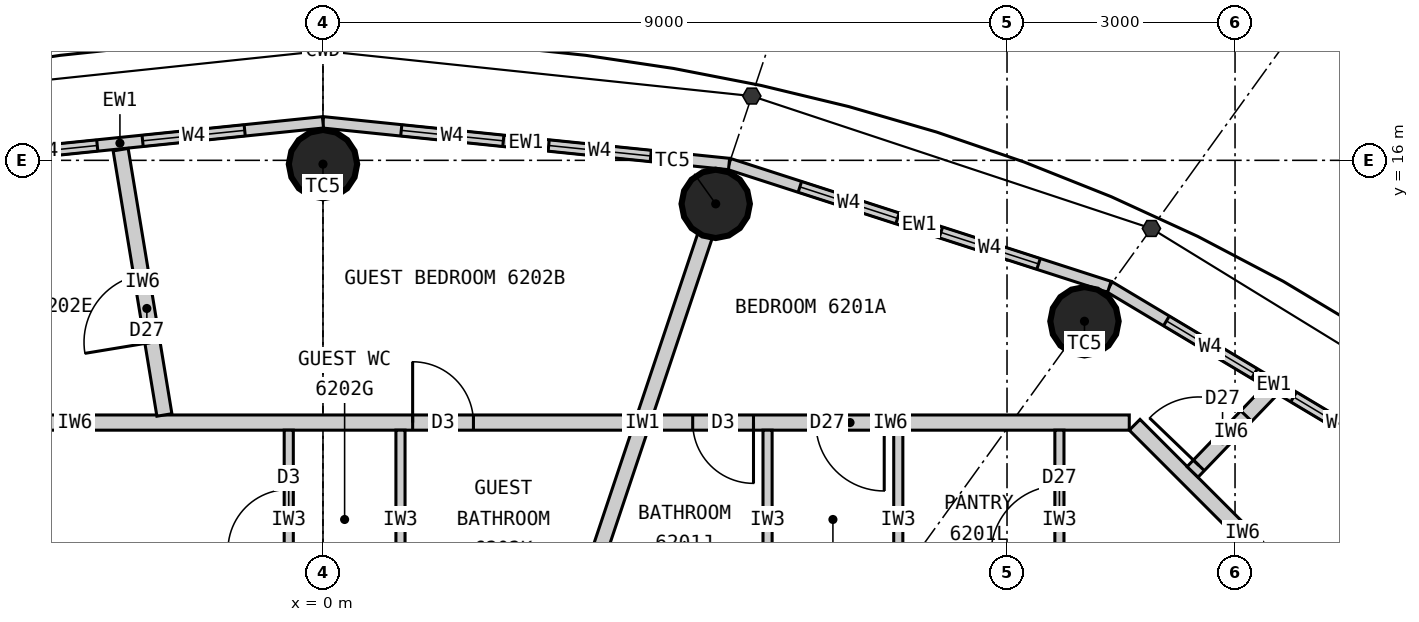
"""IFC4 building model, lengths in metres.
Left out: names, types, materials, properties, quantities, classifications, styles, units other than length and angle.
Written with IfcOpenShell. Run it as: python <this file> out.ifc"""

import sys

from ifc_helpers import new_model, si_unit, direction, frame, frame_2d, origin, origin_2d, place, context, subcontext, project, spatial, rectangle, circle, extrude, clip, halfspace, element, fill, save


model = new_model("IFC4")
c1 = context("Model", 3, precision=1e-05, world=origin(), true_north=direction((0.0, 1.0)))
c2 = subcontext(c1, "Body", "Model", "MODEL_VIEW")
j1 = project(units=[si_unit("LENGTHUNIT", "METRE"), si_unit("PLANEANGLEUNIT", "RADIAN")], contexts=[c1])
p1 = place(None, origin())
s1 = spatial("IfcSite", under=j1, at=p1, CompositionType="ELEMENT")
p2 = place(p1, origin())
s2 = spatial("IfcBuilding", under=s1, at=p2, CompositionType="ELEMENT")
p3 = place(p2, frame((0.0, 0.0, 229.2)))
s3 = spatial("IfcBuildingStorey", under=s2, at=p3, CompositionType="ELEMENT", Elevation=229.2)
for number, where, z_axis, x_axis in (
    (1, (10.019, 13.883, 0.0), (0.0, 0.0, 1.0), (1.0, 0.0, 0.0)),
    (2, (5.167, 15.427, 0.0), (0.0, 0.0, 1.0), (1.0, 0.0, 0.0)),
    (3, (0.0, 15.95, 0.0), (0.0, 0.0, 1.0), (1.0, 0.0, 0.0)),
):
    element("IfcColumn", number, at=place(p3, frame(where, z_axis=z_axis, x_axis=x_axis)), inside=s3, PredefinedType="COLUMN", context=c2, shape_type="Clipping", body=[
        clip(extrude(circle(Radius=0.45, at=origin_2d()), origin(), (0.0, 0.0, 1.0), 3.3), halfspace(frame((0.0, 0.0, 2.25), z_axis=(0.0, 0.0, 1.0), x_axis=(1.0, 0.0, 0.0)), False)),
    ])
p4 = place(p3, frame((14.68, 11.744, 0.0), z_axis=(0.0, 0.0, 1.0), x_axis=(-0.85822150553, 0.513279502265, 0.0)))
e4 = element("IfcWall", 4, at=p4, inside=s3, PredefinedType="ELEMENTEDWALL", context=c2, shape_type="SweptSolid", body=[
    extrude(rectangle(XDim=5.05, YDim=0.15, at=frame_2d((2.525, 0.0))), origin(), (0.0, 0.0, 1.0), 3.05),
])
p5 = place(p4, frame((0.875, 0.0, 0.9)))
e5 = element("IfcOpeningElement", 5, at=p5, cuts=e4, PredefinedType="OPENING", context=c2, shape_type="SweptSolid", body=[
    extrude(rectangle(XDim=1.35, YDim=1.9, at=frame_2d((0.675, 0.95))), frame((0.0, 0.085, 0.0), z_axis=(0.0, -1.0, 0.0), x_axis=(1.0, 0.0, 0.0)), (0.0, 0.0, 1.0), 0.17),
])
p6 = place(p4, frame((2.825, 0.0, 0.9)))
e6 = element("IfcOpeningElement", 6, at=p6, cuts=e4, PredefinedType="OPENING", context=c2, shape_type="SweptSolid", body=[
    extrude(rectangle(XDim=1.35, YDim=1.9, at=frame_2d((0.675, 0.95))), frame((0.0, 0.085, 0.0), z_axis=(0.0, -1.0, 0.0), x_axis=(1.0, 0.0, 0.0)), (0.0, 0.0, 1.0), 0.17),
])
p7 = place(p3, frame((10.346, 14.336, 0.0), z_axis=(0.0, 0.0, 1.0), x_axis=(-0.951644702515, 0.307200846638, 0.0)))
e7 = element("IfcWall", 7, at=p7, inside=s3, PredefinedType="ELEMENTEDWALL", context=c2, shape_type="SweptSolid", body=[
    extrude(rectangle(XDim=5.258, YDim=0.15, at=frame_2d((2.629, 0.0))), origin(), (0.0, 0.0, 1.0), 3.05),
])
p8 = place(p7, frame((0.979, 0.0, 0.9)))
e8 = element("IfcOpeningElement", 8, at=p8, cuts=e7, PredefinedType="OPENING", context=c2, shape_type="SweptSolid", body=[
    extrude(rectangle(XDim=1.35, YDim=1.9, at=frame_2d((0.675, 0.95))), frame((0.0, 0.085, 0.0), z_axis=(0.0, -1.0, 0.0), x_axis=(1.0, 0.0, 0.0)), (0.0, 0.0, 1.0), 0.17),
])
p9 = place(p7, frame((2.929, 0.0, 0.9)))
e9 = element("IfcOpeningElement", 9, at=p9, cuts=e7, PredefinedType="OPENING", context=c2, shape_type="SweptSolid", body=[
    extrude(rectangle(XDim=1.35, YDim=1.9, at=frame_2d((0.675, 0.95))), frame((0.0, 0.085, 0.0), z_axis=(0.0, -1.0, 0.0), x_axis=(1.0, 0.0, 0.0)), (0.0, 0.0, 1.0), 0.17),
])
p10 = place(p3, frame((5.343, 15.952, 0.0), z_axis=(0.0, 0.0, 1.0), x_axis=(-0.994774574972, 0.102095763818, 0.0)))
e10 = element("IfcWall", 10, at=p10, inside=s3, PredefinedType="ELEMENTEDWALL", context=c2, shape_type="SweptSolid", body=[
    extrude(rectangle(XDim=5.371, YDim=0.15, at=frame_2d((2.686, 0.0))), origin(), (0.0, 0.0, 1.0), 3.05),
])
p11 = place(p10, frame((1.035, 0.0, 0.9)))
e11 = element("IfcOpeningElement", 11, at=p11, cuts=e10, PredefinedType="OPENING", context=c2, shape_type="SweptSolid", body=[
    extrude(rectangle(XDim=1.35, YDim=1.9, at=frame_2d((0.675, 0.95))), frame((0.0, 0.085, 0.0), z_axis=(0.0, -1.0, 0.0), x_axis=(1.0, 0.0, 0.0)), (0.0, 0.0, 1.0), 0.17),
])
p12 = place(p10, frame((2.985, 0.0, 0.9)))
e12 = element("IfcOpeningElement", 12, at=p12, cuts=e10, PredefinedType="OPENING", context=c2, shape_type="SweptSolid", body=[
    extrude(rectangle(XDim=1.35, YDim=1.9, at=frame_2d((0.675, 0.95))), frame((0.0, 0.085, 0.0), z_axis=(0.0, -1.0, 0.0), x_axis=(1.0, 0.0, 0.0)), (0.0, 0.0, 1.0), 0.17),
])
p13 = place(p3, frame((0.0, 16.5, 0.0), z_axis=(0.0, 0.0, 1.0), x_axis=(-0.994774574972, -0.102095763818, 0.0)))
e13 = element("IfcWall", 13, at=p13, inside=s3, PredefinedType="ELEMENTEDWALL", context=c2, shape_type="SweptSolid", body=[
    extrude(rectangle(XDim=5.371, YDim=0.15, at=frame_2d((2.686, 0.0))), origin(), (0.0, 0.0, 1.0), 3.05),
])
p14 = place(p13, frame((1.035, 0.0, 0.9)))
e14 = element("IfcOpeningElement", 14, at=p14, cuts=e13, PredefinedType="OPENING", context=c2, shape_type="SweptSolid", body=[
    extrude(rectangle(XDim=1.35, YDim=1.9, at=frame_2d((0.675, 0.95))), frame((0.0, 0.085, 0.0), z_axis=(0.0, -1.0, 0.0), x_axis=(1.0, 0.0, 0.0)), (0.0, 0.0, 1.0), 0.17),
])
p15 = place(p13, frame((2.985, 0.0, 0.9)))
e15 = element("IfcOpeningElement", 15, at=p15, cuts=e13, PredefinedType="OPENING", context=c2, shape_type="SweptSolid", body=[
    extrude(rectangle(XDim=1.35, YDim=1.9, at=frame_2d((0.675, 0.95))), frame((0.0, 0.085, 0.0), z_axis=(0.0, -1.0, 0.0), x_axis=(1.0, 0.0, 0.0)), (0.0, 0.0, 1.0), 0.17),
])
p16 = place(p3, frame((3.383, 10.1, 0.0), z_axis=(0.0, 0.0, 1.0), x_axis=(0.317602151035, 0.948224063003, 0.0)))
e16 = element("IfcWall", 16, at=p16, inside=s3, PredefinedType="PARTITIONING", context=c2, shape_type="SweptSolid", body=[
    extrude(rectangle(XDim=5.168, YDim=0.2, at=frame_2d((2.584, 0.0))), origin(), (0.0, 0.0, 1.0), 2.15),
])
p17 = place(p3, frame((13.521, 9.679, 0.0), z_axis=(0.0, 0.0, 1.0), x_axis=(-0.707106781187, 0.707106781187, 0.0)))
e17 = element("IfcWall", 17, at=p17, inside=s3, PredefinedType="PARTITIONING", context=c2, shape_type="SweptSolid", body=[
    extrude(rectangle(XDim=4.019, YDim=0.2, at=frame_2d((2.009, 0.0))), origin(), (0.0, 0.0, 1.0), 3.05),
])
p18 = place(p3, frame((10.609, 12.55, 0.0), z_axis=(0.0, 0.0, 1.0), x_axis=(-1.0, 0.0, 0.0)))
e18 = element("IfcWall", 18, at=p18, inside=s3, PredefinedType="PARTITIONING", context=c2, shape_type="SweptSolid", body=[
    extrude(rectangle(XDim=6.284, YDim=0.2, at=frame_2d((3.142, 0.0))), origin(), (0.0, 0.0, 1.0), 3.05),
])
p19 = place(p18, frame((3.224, 0.0, 0.0)))
e19 = element("IfcOpeningElement", 19, at=p19, cuts=e18, PredefinedType="OPENING", context=c2, shape_type="SweptSolid", body=[
    extrude(rectangle(XDim=0.9, YDim=2.1, at=frame_2d((0.45, 1.05))), frame((0.0, 0.11, 0.0), z_axis=(0.0, -1.0, 0.0), x_axis=(1.0, 0.0, 0.0)), (0.0, 0.0, 1.0), 0.22),
])
p20 = place(p18, frame((4.944, 0.0, 0.0)))
e20 = element("IfcOpeningElement", 20, at=p20, cuts=e18, PredefinedType="OPENING", context=c2, shape_type="SweptSolid", body=[
    extrude(rectangle(XDim=0.8, YDim=2.1, at=frame_2d((0.4, 1.05))), frame((0.0, 0.11, 0.0), z_axis=(0.0, -1.0, 0.0), x_axis=(1.0, 0.0, 0.0)), (0.0, 0.0, 1.0), 0.22),
])
p21 = place(p3, frame((11.441, 11.9, 0.0), z_axis=(0.0, 0.0, 1.0), x_axis=(0.692958717259, 0.720977264672, 0.0)))
e21 = element("IfcWall", 21, at=p21, inside=s3, PredefinedType="PARTITIONING", context=c2, shape_type="SweptSolid", body=[
    extrude(rectangle(XDim=1.464, YDim=0.2, at=frame_2d((0.732, 0.0))), origin(), (0.0, 0.0, 1.0), 3.05),
])
p22 = place(p21, frame((0.12, 0.0, 0.0)))
e22 = element("IfcOpeningElement", 22, at=p22, cuts=e21, PredefinedType="OPENING", context=c2, shape_type="SweptSolid", body=[
    extrude(rectangle(XDim=0.9, YDim=2.1, at=frame_2d((0.45, 1.05))), frame((0.0, 0.11, 0.0), z_axis=(0.0, -1.0, 0.0), x_axis=(1.0, 0.0, 0.0)), (0.0, 0.0, 1.0), 0.22),
])
p23 = place(p3, frame((9.689, 10.1, 0.0), z_axis=(0.0, 0.0, 1.0), x_axis=(0.0, 1.0, 0.0)))
e23 = element("IfcWall", 23, at=p23, inside=s3, PredefinedType="PARTITIONING", context=c2, shape_type="SweptSolid", body=[
    extrude(rectangle(XDim=2.35, YDim=0.12, at=frame_2d((1.175, 0.0))), origin(), (0.0, 0.0, 1.0), 3.05),
])
p24 = place(p23, frame((0.72, 0.0, 0.0)))
e24 = element("IfcOpeningElement", 24, at=p24, cuts=e23, PredefinedType="OPENING", context=c2, shape_type="SweptSolid", body=[
    extrude(rectangle(XDim=0.9, YDim=2.1, at=frame_2d((0.45, 1.05))), frame((0.0, 0.07, 0.0), z_axis=(0.0, -1.0, 0.0), x_axis=(1.0, 0.0, 0.0)), (0.0, 0.0, 1.0), 0.14),
])
for number, where, z_axis, x_axis in (
    (25, (7.569, 10.1, 0.0), (0.0, 0.0, 1.0), (0.0, 1.0, 0.0)),
    (26, (5.849, 10.1, 0.0), (0.0, 0.0, 1.0), (0.0, 1.0, 0.0)),
):
    element("IfcWall", number, at=place(p3, frame(where, z_axis=z_axis, x_axis=x_axis)), inside=s3, PredefinedType="PARTITIONING", context=c2, shape_type="SweptSolid", body=[
        extrude(rectangle(XDim=2.35, YDim=0.12, at=frame_2d((1.175, 0.0))), origin(), (0.0, 0.0, 1.0), 3.05),
    ])
p25 = place(p3, frame((4.082, 12.55, 0.0), z_axis=(0.0, 0.0, 1.0), x_axis=(-1.0, 0.0, 0.0)))
e27 = element("IfcWall", 27, at=p25, inside=s3, PredefinedType="PARTITIONING", context=c2, shape_type="SweptSolid", body=[
    extrude(rectangle(XDim=14.691, YDim=0.2, at=frame_2d((7.345, 0.0))), origin(), (0.0, 0.0, 1.0), 3.05),
])
p26 = place(p25, frame((2.102, 0.0, 0.0)))
e28 = element("IfcOpeningElement", 28, at=p26, cuts=e27, PredefinedType="OPENING", context=c2, shape_type="SweptSolid", body=[
    extrude(rectangle(XDim=0.8, YDim=2.1, at=frame_2d((0.4, 1.05))), frame((0.0, 0.11, 0.0), z_axis=(0.0, -1.0, 0.0), x_axis=(1.0, 0.0, 0.0)), (0.0, 0.0, 1.0), 0.22),
])
p27 = place(p25, frame((11.22, 0.0, 0.0)))
e29 = element("IfcOpeningElement", 29, at=p27, cuts=e27, PredefinedType="OPENING", context=c2, shape_type="SweptSolid", body=[
    extrude(rectangle(XDim=0.9, YDim=2.1, at=frame_2d((0.45, 1.05))), frame((0.0, 0.11, 0.0), z_axis=(0.0, -1.0, 0.0), x_axis=(1.0, 0.0, 0.0)), (0.0, 0.0, 1.0), 0.22),
])
p28 = place(p3, frame((-2.086, 12.65, 0.0), z_axis=(0.0, 0.0, 1.0), x_axis=(-0.162664077359, 0.986681507852, 0.0)))
e30 = element("IfcWall", 30, at=p28, inside=s3, PredefinedType="PARTITIONING", context=c2, shape_type="SweptSolid", body=[
    extrude(rectangle(XDim=3.538, YDim=0.2, at=frame_2d((1.769, 0.0))), origin(), (0.0, 0.0, 1.0), 3.05),
])
p29 = place(p28, frame((0.97, 0.0, 0.0)))
e31 = element("IfcOpeningElement", 31, at=p29, cuts=e30, PredefinedType="OPENING", context=c2, shape_type="SweptSolid", body=[
    extrude(rectangle(XDim=0.9, YDim=2.1, at=frame_2d((0.45, 1.05))), frame((0.0, 0.11, 0.0), z_axis=(0.0, -1.0, 0.0), x_axis=(1.0, 0.0, 0.0)), (0.0, 0.0, 1.0), 0.22),
])
p30 = place(p3, frame((1.02, 10.1, 0.0), z_axis=(0.0, 0.0, 1.0), x_axis=(0.0, 1.0, 0.0)))
e32 = element("IfcWall", 32, at=p30, inside=s3, PredefinedType="PARTITIONING", context=c2, shape_type="SweptSolid", body=[
    extrude(rectangle(XDim=2.35, YDim=0.12, at=frame_2d((1.175, 0.0))), origin(), (0.0, 0.0, 1.0), 3.05),
])
p31 = place(p3, frame((-0.45, 10.1, 0.0), z_axis=(0.0, 0.0, 1.0), x_axis=(0.0, 1.0, 0.0)))
e33 = element("IfcWall", 33, at=p31, inside=s3, PredefinedType="PARTITIONING", context=c2, shape_type="SweptSolid", body=[
    extrude(rectangle(XDim=2.35, YDim=0.12, at=frame_2d((1.175, 0.0))), origin(), (0.0, 0.0, 1.0), 3.05),
])
p32 = place(p31, frame((0.77, 0.0, 0.0)))
e34 = element("IfcOpeningElement", 34, at=p32, cuts=e33, PredefinedType="OPENING", context=c2, shape_type="SweptSolid", body=[
    extrude(rectangle(XDim=0.8, YDim=2.1, at=frame_2d((0.4, 1.05))), frame((0.0, 0.07, 0.0), z_axis=(0.0, -1.0, 0.0), x_axis=(1.0, 0.0, 0.0)), (0.0, 0.0, 1.0), 0.14),
])
p33 = place(p5, origin())
e35 = element("IfcWindow", 35, at=p33, inside=s3, PartitioningType="SINGLE_PANEL", PredefinedType="WINDOW", context=c2, shape_type="SweptSolid", body=[
    extrude(rectangle(XDim=1.35, YDim=1.9, at=frame_2d((0.675, 0.95))), frame((0.0, 0.03, 0.0), z_axis=(0.0, -1.0, 0.0), x_axis=(1.0, 0.0, 0.0)), (0.0, 0.0, 1.0), 0.06),
])
fill(e5, e35)
p34 = place(p6, origin())
e36 = element("IfcWindow", 36, at=p34, inside=s3, PartitioningType="SINGLE_PANEL", PredefinedType="WINDOW", context=c2, shape_type="SweptSolid", body=[
    extrude(rectangle(XDim=1.35, YDim=1.9, at=frame_2d((0.675, 0.95))), frame((0.0, 0.03, 0.0), z_axis=(0.0, -1.0, 0.0), x_axis=(1.0, 0.0, 0.0)), (0.0, 0.0, 1.0), 0.06),
])
fill(e6, e36)
p35 = place(p8, origin())
e37 = element("IfcWindow", 37, at=p35, inside=s3, PartitioningType="SINGLE_PANEL", PredefinedType="WINDOW", context=c2, shape_type="SweptSolid", body=[
    extrude(rectangle(XDim=1.35, YDim=1.9, at=frame_2d((0.675, 0.95))), frame((0.0, 0.03, 0.0), z_axis=(0.0, -1.0, 0.0), x_axis=(1.0, 0.0, 0.0)), (0.0, 0.0, 1.0), 0.06),
])
fill(e8, e37)
p36 = place(p9, origin())
e38 = element("IfcWindow", 38, at=p36, inside=s3, PartitioningType="SINGLE_PANEL", PredefinedType="WINDOW", context=c2, shape_type="SweptSolid", body=[
    extrude(rectangle(XDim=1.35, YDim=1.9, at=frame_2d((0.675, 0.95))), frame((0.0, 0.03, 0.0), z_axis=(0.0, -1.0, 0.0), x_axis=(1.0, 0.0, 0.0)), (0.0, 0.0, 1.0), 0.06),
])
fill(e9, e38)
p37 = place(p11, origin())
e39 = element("IfcWindow", 39, at=p37, inside=s3, PartitioningType="SINGLE_PANEL", PredefinedType="WINDOW", context=c2, shape_type="SweptSolid", body=[
    extrude(rectangle(XDim=1.35, YDim=1.9, at=frame_2d((0.675, 0.95))), frame((0.0, 0.03, 0.0), z_axis=(0.0, -1.0, 0.0), x_axis=(1.0, 0.0, 0.0)), (0.0, 0.0, 1.0), 0.06),
])
fill(e11, e39)
p38 = place(p12, origin())
e40 = element("IfcWindow", 40, at=p38, inside=s3, PartitioningType="SINGLE_PANEL", PredefinedType="WINDOW", context=c2, shape_type="SweptSolid", body=[
    extrude(rectangle(XDim=1.35, YDim=1.9, at=frame_2d((0.675, 0.95))), frame((0.0, 0.03, 0.0), z_axis=(0.0, -1.0, 0.0), x_axis=(1.0, 0.0, 0.0)), (0.0, 0.0, 1.0), 0.06),
])
fill(e12, e40)
p39 = place(p14, origin())
e41 = element("IfcWindow", 41, at=p39, inside=s3, PartitioningType="SINGLE_PANEL", PredefinedType="WINDOW", context=c2, shape_type="SweptSolid", body=[
    extrude(rectangle(XDim=1.35, YDim=1.9, at=frame_2d((0.675, 0.95))), frame((0.0, 0.03, 0.0), z_axis=(0.0, -1.0, 0.0), x_axis=(1.0, 0.0, 0.0)), (0.0, 0.0, 1.0), 0.06),
])
fill(e14, e41)
p40 = place(p15, origin())
e42 = element("IfcWindow", 42, at=p40, inside=s3, PartitioningType="SINGLE_PANEL", PredefinedType="WINDOW", context=c2, shape_type="SweptSolid", body=[
    extrude(rectangle(XDim=1.35, YDim=1.9, at=frame_2d((0.675, 0.95))), frame((0.0, 0.03, 0.0), z_axis=(0.0, -1.0, 0.0), x_axis=(1.0, 0.0, 0.0)), (0.0, 0.0, 1.0), 0.06),
])
fill(e15, e42)
p41 = place(p24, origin())
e43 = element("IfcDoor", 43, at=p41, inside=s3, OperationType="SINGLE_SWING_LEFT", PredefinedType="DOOR", context=c2, shape_type="SweptSolid", body=[
    extrude(rectangle(XDim=0.9, YDim=2.1, at=frame_2d((0.45, 1.05))), frame((0.0, 0.025, 0.0), z_axis=(0.0, -1.0, 0.0), x_axis=(1.0, 0.0, 0.0)), (0.0, 0.0, 1.0), 0.05),
])
fill(e24, e43)
p42 = place(p19, origin())
e44 = element("IfcDoor", 44, at=p42, inside=s3, OperationType="SINGLE_SWING_LEFT", PredefinedType="DOOR", context=c2, shape_type="SweptSolid", body=[
    extrude(rectangle(XDim=0.9, YDim=2.1, at=frame_2d((0.45, 1.05))), frame((0.0, 0.025, 0.0), z_axis=(0.0, -1.0, 0.0), x_axis=(1.0, 0.0, 0.0)), (0.0, 0.0, 1.0), 0.05),
])
fill(e19, e44)
p43 = place(p20, origin())
e45 = element("IfcDoor", 45, at=p43, inside=s3, OperationType="SINGLE_SWING_LEFT", PredefinedType="DOOR", context=c2, shape_type="SweptSolid", body=[
    extrude(rectangle(XDim=0.8, YDim=2.1, at=frame_2d((0.4, 1.05))), frame((0.0, 0.025, 0.0), z_axis=(0.0, -1.0, 0.0), x_axis=(1.0, 0.0, 0.0)), (0.0, 0.0, 1.0), 0.05),
])
fill(e20, e45)
p44 = place(p22, origin())
e46 = element("IfcDoor", 46, at=p44, inside=s3, OperationType="SINGLE_SWING_LEFT", PredefinedType="DOOR", context=c2, shape_type="SweptSolid", body=[
    extrude(rectangle(XDim=0.9, YDim=2.1, at=frame_2d((0.45, 1.05))), frame((0.0, 0.025, 0.0), z_axis=(0.0, -1.0, 0.0), x_axis=(1.0, 0.0, 0.0)), (0.0, 0.0, 1.0), 0.05),
])
fill(e22, e46)
p45 = place(p26, origin())
e47 = element("IfcDoor", 47, at=p45, inside=s3, OperationType="SINGLE_SWING_RIGHT", PredefinedType="DOOR", context=c2, shape_type="SweptSolid", body=[
    extrude(rectangle(XDim=0.8, YDim=2.1, at=frame_2d((0.4, 1.05))), frame((0.0, 0.025, 0.0), z_axis=(0.0, -1.0, 0.0), x_axis=(1.0, 0.0, 0.0)), (0.0, 0.0, 1.0), 0.05),
])
fill(e28, e47)
p46 = place(p32, origin())
e48 = element("IfcDoor", 48, at=p46, inside=s3, OperationType="SINGLE_SWING_LEFT", PredefinedType="DOOR", context=c2, shape_type="SweptSolid", body=[
    extrude(rectangle(XDim=0.8, YDim=2.1, at=frame_2d((0.4, 1.05))), frame((0.0, 0.025, 0.0), z_axis=(0.0, -1.0, 0.0), x_axis=(1.0, 0.0, 0.0)), (0.0, 0.0, 1.0), 0.05),
])
fill(e34, e48)
p47 = place(p29, origin())
e49 = element("IfcDoor", 49, at=p47, inside=s3, OperationType="SINGLE_SWING_LEFT", PredefinedType="DOOR", context=c2, shape_type="SweptSolid", body=[
    extrude(rectangle(XDim=0.9, YDim=2.1, at=frame_2d((0.45, 1.05))), frame((0.0, 0.025, 0.0), z_axis=(0.0, -1.0, 0.0), x_axis=(1.0, 0.0, 0.0)), (0.0, 0.0, 1.0), 0.05),
])
fill(e31, e49)
save(model, sys.argv[1])
